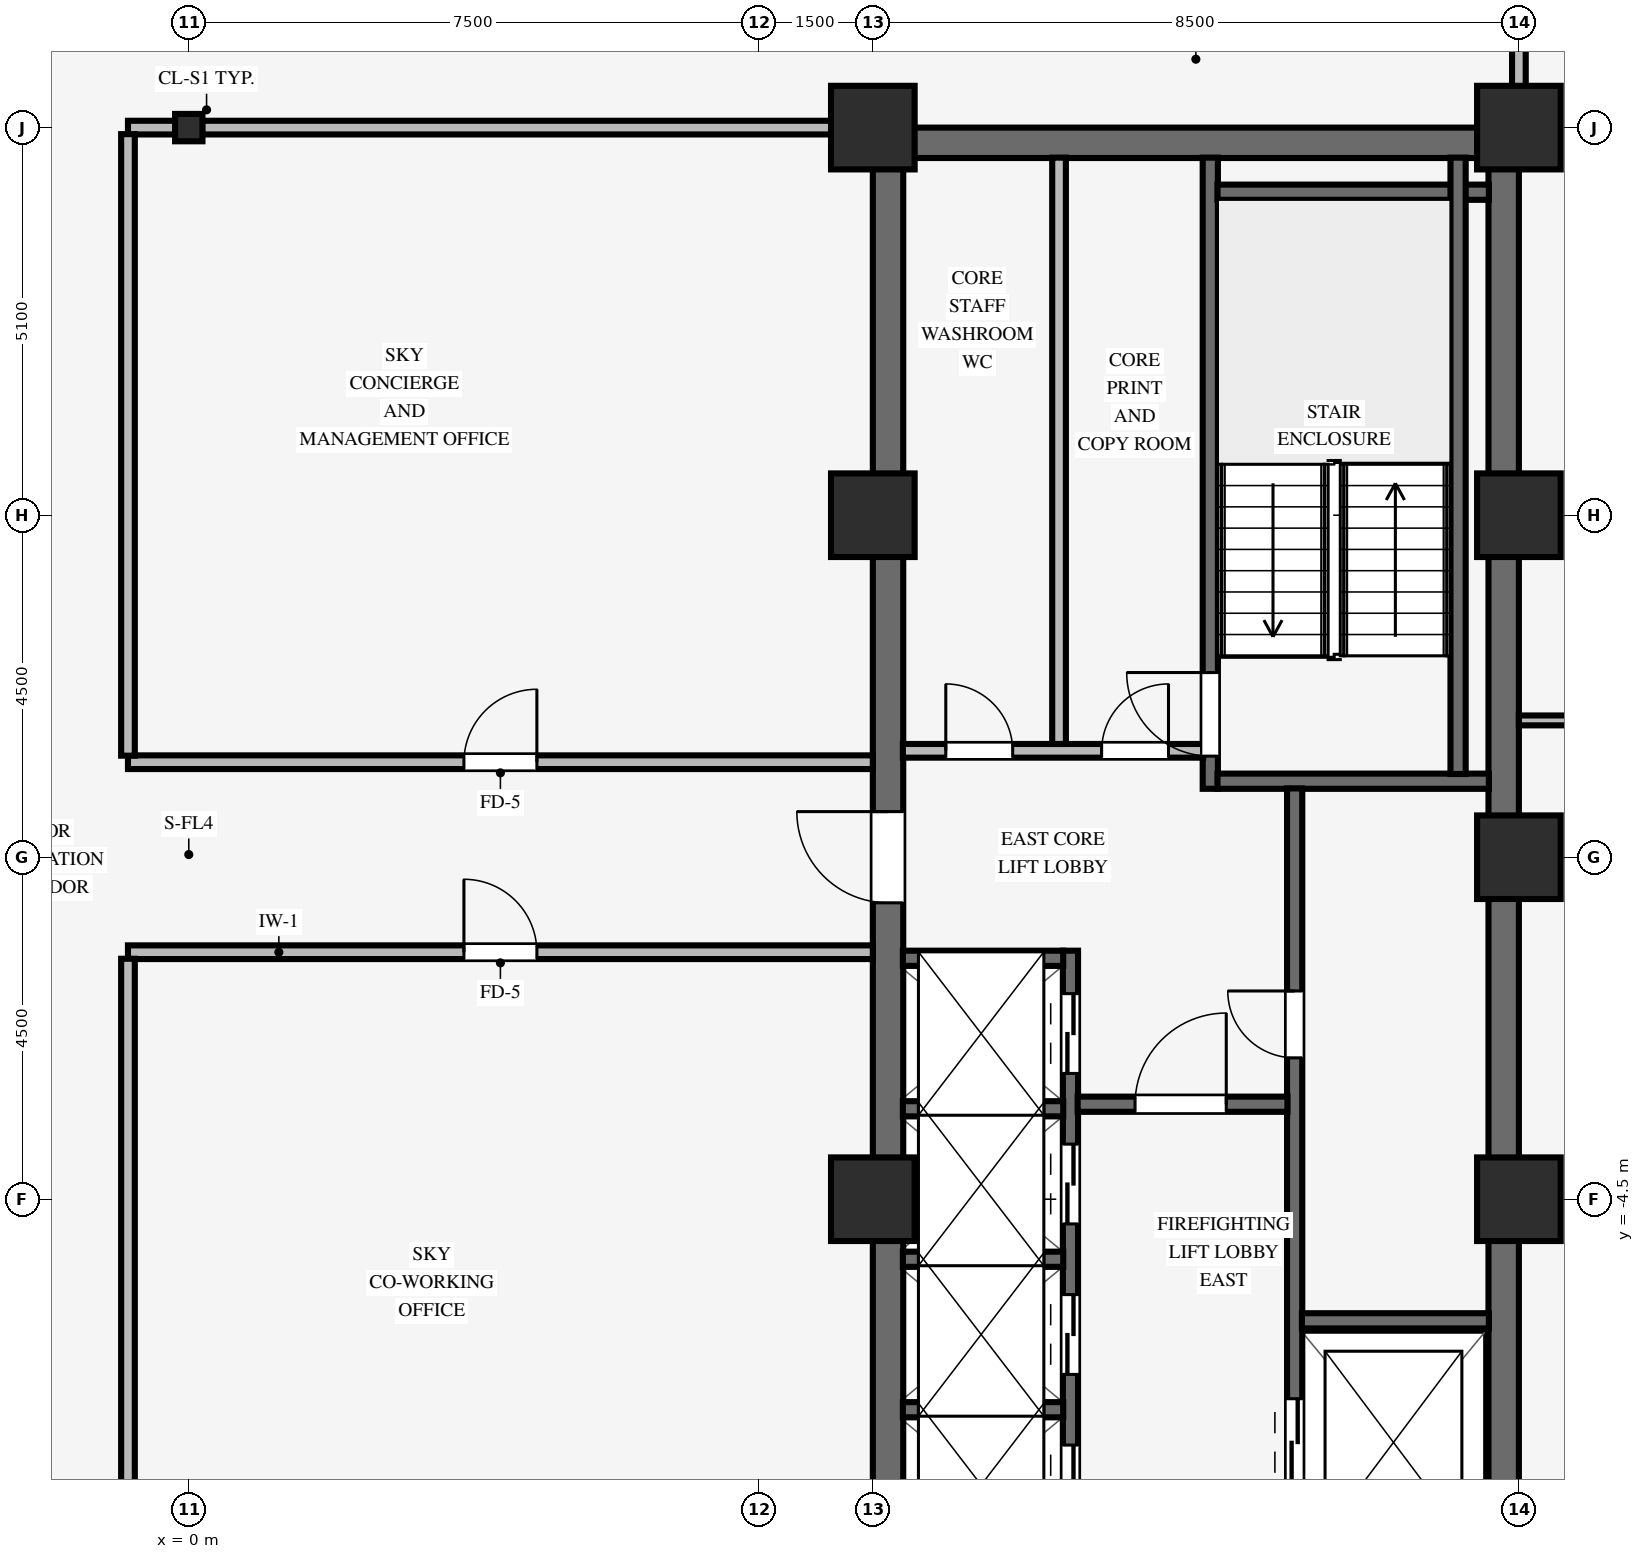
"""IFC4 building model, lengths in metres.
Left out: names, types, materials, properties, quantities, classifications, styles, units other than length and angle.
Written with IfcOpenShell. Run it as: python <this file> out.ifc"""

import sys

from ifc_helpers import new_model, si_unit, direction, frame, frame_2d, origin, origin_2d, place, context, subcontext, project, spatial, rectangle, i_section, extrude, source, transform, mapped, element, fill, save


model = new_model("IFC4")
c1 = context("Model", 3, precision=1e-05, world=origin(), true_north=direction((0.0, 1.0)))
c2 = subcontext(c1, "Body", "Model", "MODEL_VIEW")
j1 = project(units=[si_unit("LENGTHUNIT", "METRE"), si_unit("PLANEANGLEUNIT", "RADIAN")], contexts=[c1])
p1 = place(None, origin())
s1 = spatial("IfcSite", under=j1, at=p1, CompositionType="ELEMENT")
p2 = place(p1, origin())
s2 = spatial("IfcBuilding", under=s1, at=p2, CompositionType="ELEMENT")
p3 = place(p2, frame((0.0, 0.0, 120.2)))
s3 = spatial("IfcBuildingStorey", under=s2, at=p3, CompositionType="ELEMENT", Elevation=120.2)
p4 = place(p3, frame((9.0, 9.4, 0.0), z_axis=(0.0, 0.0, 1.0), x_axis=(1.0, 0.0, 0.0)))
e1 = element("IfcWall", 1, at=p4, inside=s3, PredefinedType="SHEAR", context=c2, shape_type="SweptSolid", body=[
    extrude(rectangle(XDim=8.5, YDim=0.4, at=frame_2d((4.25, 0.0))), origin(), (0.0, 0.0, 1.0), 3.37),
])
p5 = place(p3, frame((9.2, -9.205, 0.0), z_axis=(0.0, 0.0, 1.0), x_axis=(0.0, 1.0, 0.0)))
e2 = element("IfcWall", 2, at=p5, inside=s3, PredefinedType="SHEAR", context=c2, shape_type="SweptSolid", body=[
    extrude(rectangle(XDim=18.41, YDim=0.4, at=frame_2d((9.205, 0.0))), origin(), (0.0, 0.0, 1.0), 3.37),
])
p6 = place(p5, frame((8.605, 0.0, 0.0)))
e3 = element("IfcOpeningElement", 3, at=p6, cuts=e2, PredefinedType="OPENING", context=c2, shape_type="SweptSolid", body=[
    extrude(rectangle(XDim=1.2, YDim=2.15, at=frame_2d((0.6, 1.075))), frame((0.0, 0.21, 0.0), z_axis=(0.0, -1.0, 0.0), x_axis=(1.0, 0.0, 0.0)), (0.0, 0.0, 1.0), 0.42),
])
p7 = place(p3, frame((17.3, -9.205, 0.0), z_axis=(0.0, 0.0, 1.0), x_axis=(0.0, 1.0, 0.0)))
e4 = element("IfcWall", 4, at=p7, inside=s3, PredefinedType="SHEAR", context=c2, shape_type="SweptSolid", body=[
    extrude(rectangle(XDim=18.41, YDim=0.4, at=frame_2d((9.205, 0.0))), origin(), (0.0, 0.0, 1.0), 3.37),
])
for number, where, z_axis, x_axis in (
    (5, (9.0, -4.5, 0.0), (0.0, 0.0, 1.0), (1.0, 0.0, 0.0)),
    (6, (9.0, 4.5, 0.0), (0.0, 0.0, 1.0), (1.0, 0.0, 0.0)),
    (7, (9.0, 9.6, 0.0), (0.0, 0.0, 1.0), (1.0, 0.0, 0.0)),
    (8, (17.5, -4.5, 0.0), (0.0, 0.0, 1.0), (1.0, 0.0, 0.0)),
    (9, (17.5, 4.5, 0.0), (0.0, 0.0, 1.0), (1.0, 0.0, 0.0)),
    (10, (17.5, 9.6, 0.0), (0.0, 0.0, 1.0), (1.0, 0.0, 0.0)),
    (11, (17.5, 0.0, 0.0), (0.0, 0.0, 1.0), (1.0, 0.0, 0.0)),
):
    element("IfcColumn", number, at=place(p3, frame(where, z_axis=z_axis, x_axis=x_axis)), inside=s3, PredefinedType="COLUMN", context=c2, shape_type="SweptSolid", body=[
        extrude(rectangle(XDim=1.1, YDim=1.1, at=origin_2d()), origin(), (0.0, 0.0, 1.0), 3.37),
    ])
p8 = place(p3, frame((0.0, 9.6, 0.0), z_axis=(0.0, 0.0, 1.0), x_axis=(1.0, 0.0, 0.0)))
e12 = element("IfcColumn", 12, at=p8, inside=s3, PredefinedType="COLUMN", context=c2, shape_type="SweptSolid", body=[
    extrude(i_section(OverallWidth=0.36, OverallDepth=0.36, WebThickness=0.021, FlangeThickness=0.021, FilletRadius=0.018, at=origin_2d()), origin(), (0.0, 0.0, 1.0), 3.37),
])
p9 = place(p3, frame((13.44, 0.9, 0.0), z_axis=(0.0, 0.0, 1.0), x_axis=(0.0, 1.0, 0.0)))
e13 = element("IfcWall", 13, at=p9, inside=s3, PredefinedType="SHEAR", context=c2, shape_type="SweptSolid", body=[
    extrude(rectangle(XDim=8.305, YDim=0.2, at=frame_2d((4.153, 0.0))), origin(), (0.0, 0.0, 1.0), 3.37),
])
p10 = place(p9, frame((0.43, 0.0, 0.0)))
e14 = element("IfcOpeningElement", 14, at=p10, cuts=e13, PredefinedType="OPENING", context=c2, shape_type="SweptSolid", body=[
    extrude(rectangle(XDim=1.1, YDim=2.15, at=frame_2d((0.55, 1.075))), frame((0.0, 0.11, 0.0), z_axis=(0.0, -1.0, 0.0), x_axis=(1.0, 0.0, 0.0)), (0.0, 0.0, 1.0), 0.22),
])
for number, where, z_axis, x_axis in (
    (15, (13.535, 1.0, 0.0), (0.0, 0.0, 1.0), (1.0, 0.0, 0.0)),
    (16, (13.535, 8.75, 0.0), (0.0, 0.0, 1.0), (1.0, 0.0, 0.0)),
):
    element("IfcWall", number, at=place(p3, frame(where, z_axis=z_axis, x_axis=x_axis)), inside=s3, PredefinedType="SHEAR", context=c2, shape_type="SweptSolid", body=[
        extrude(rectangle(XDim=3.57, YDim=0.2, at=frame_2d((1.785, 0.0))), origin(), (0.0, 0.0, 1.0), 3.37),
    ])
p11 = place(p3, frame((16.7, 1.095, 0.0), z_axis=(0.0, 0.0, 1.0), x_axis=(0.0, 1.0, 0.0)))
e17 = element("IfcWall", 17, at=p11, inside=s3, PredefinedType="SHEAR", context=c2, shape_type="SweptSolid", body=[
    extrude(rectangle(XDim=8.11, YDim=0.2, at=frame_2d((4.055, 0.0))), origin(), (0.0, 0.0, 1.0), 3.37),
])
p12 = place(p3, frame((14.55, -9.205, 0.0), z_axis=(0.0, 0.0, 1.0), x_axis=(0.0, 1.0, 0.0)))
e18 = element("IfcWall", 18, at=p12, inside=s3, PredefinedType="SHEAR", context=c2, shape_type="SweptSolid", body=[
    extrude(rectangle(XDim=10.11, YDim=0.2, at=frame_2d((5.055, 0.0))), origin(), (0.0, 0.0, 1.0), 3.37),
])
p13 = place(p12, frame((6.565, 0.0, 0.0)))
e19 = element("IfcOpeningElement", 19, at=p13, cuts=e18, PredefinedType="OPENING", context=c2, shape_type="SweptSolid", body=[
    extrude(rectangle(XDim=0.88, YDim=2.1, at=frame_2d((0.44, 1.05))), frame((0.0, 0.11, 0.0), z_axis=(0.0, -1.0, 0.0), x_axis=(1.0, 0.0, 0.0)), (0.0, 0.0, 1.0), 0.22),
])
p14 = place(p12, frame((0.93, 0.0, 0.0)))
e20 = element("IfcOpeningElement", 20, at=p14, cuts=e18, PredefinedType="OPENING", context=c2, shape_type="SweptSolid", body=[
    extrude(rectangle(XDim=1.15, YDim=2.15, at=frame_2d((0.575, 1.075))), frame((0.0, 0.11, 0.0), z_axis=(0.0, -1.0, 0.0), x_axis=(1.0, 0.0, 0.0)), (0.0, 0.0, 1.0), 0.22),
])
p15 = place(p3, frame((14.645, -6.1, 0.0), z_axis=(0.0, 0.0, 1.0), x_axis=(1.0, 0.0, 0.0)))
e21 = element("IfcWall", 21, at=p15, inside=s3, PredefinedType="SHEAR", context=c2, shape_type="SweptSolid", body=[
    extrude(rectangle(XDim=2.46, YDim=0.2, at=frame_2d((1.23, 0.0))), origin(), (0.0, 0.0, 1.0), 3.37),
])
p16 = place(p3, frame((11.6, -9.205, 0.0), z_axis=(0.0, 0.0, 1.0), x_axis=(0.0, 1.0, 0.0)))
e22 = element("IfcWall", 22, at=p16, inside=s3, PredefinedType="SHEAR", context=c2, shape_type="SweptSolid", body=[
    extrude(rectangle(XDim=7.975, YDim=0.2, at=frame_2d((3.988, 0.0))), origin(), (0.0, 0.0, 1.0), 3.37),
])
p17 = place(p16, frame((0.42, 0.0, 0.0)))
e23 = element("IfcOpeningElement", 23, at=p17, cuts=e22, PredefinedType="OPENING", context=c2, shape_type="SweptSolid", body=[
    extrude(rectangle(XDim=1.05, YDim=2.15, at=frame_2d((0.525, 1.075))), frame((0.0, 0.11, 0.0), z_axis=(0.0, -1.0, 0.0), x_axis=(1.0, 0.0, 0.0)), (0.0, 0.0, 1.0), 0.22),
])
p18 = place(p16, frame((2.4, 0.0, 0.0)))
e24 = element("IfcOpeningElement", 24, at=p18, cuts=e22, PredefinedType="OPENING", context=c2, shape_type="SweptSolid", body=[
    extrude(rectangle(XDim=1.05, YDim=2.15, at=frame_2d((0.525, 1.075))), frame((0.0, 0.11, 0.0), z_axis=(0.0, -1.0, 0.0), x_axis=(1.0, 0.0, 0.0)), (0.0, 0.0, 1.0), 0.22),
])
p19 = place(p16, frame((4.38, 0.0, 0.0)))
e25 = element("IfcOpeningElement", 25, at=p19, cuts=e22, PredefinedType="OPENING", context=c2, shape_type="SweptSolid", body=[
    extrude(rectangle(XDim=1.05, YDim=2.15, at=frame_2d((0.525, 1.075))), frame((0.0, 0.11, 0.0), z_axis=(0.0, -1.0, 0.0), x_axis=(1.0, 0.0, 0.0)), (0.0, 0.0, 1.0), 0.22),
])
p20 = place(p16, frame((6.36, 0.0, 0.0)))
e26 = element("IfcOpeningElement", 26, at=p20, cuts=e22, PredefinedType="OPENING", context=c2, shape_type="SweptSolid", body=[
    extrude(rectangle(XDim=1.05, YDim=2.15, at=frame_2d((0.525, 1.075))), frame((0.0, 0.11, 0.0), z_axis=(0.0, -1.0, 0.0), x_axis=(1.0, 0.0, 0.0)), (0.0, 0.0, 1.0), 0.22),
])
p21 = place(p3, frame((11.695, -3.25, 0.0), z_axis=(0.0, 0.0, 1.0), x_axis=(1.0, 0.0, 0.0)))
e27 = element("IfcWall", 27, at=p21, inside=s3, PredefinedType="SHEAR", context=c2, shape_type="SweptSolid", body=[
    extrude(rectangle(XDim=2.76, YDim=0.2, at=frame_2d((1.38, 0.0))), origin(), (0.0, 0.0, 1.0), 3.37),
])
p22 = place(p21, frame((0.755, 0.0, 0.0)))
e28 = element("IfcOpeningElement", 28, at=p22, cuts=e27, PredefinedType="OPENING", context=c2, shape_type="SweptSolid", body=[
    extrude(rectangle(XDim=1.2, YDim=2.15, at=frame_2d((0.6, 1.075))), frame((0.0, 0.11, 0.0), z_axis=(0.0, -1.0, 0.0), x_axis=(1.0, 0.0, 0.0)), (0.0, 0.0, 1.0), 0.22),
])
for number, where, z_axis, x_axis in (
    (29, (9.395, -7.27, 0.0), (0.0, 0.0, 1.0), (1.0, 0.0, 0.0)),
    (30, (9.395, -5.29, 0.0), (0.0, 0.0, 1.0), (1.0, 0.0, 0.0)),
    (31, (9.395, -3.31, 0.0), (0.0, 0.0, 1.0), (1.0, 0.0, 0.0)),
    (32, (9.395, -1.33, 0.0), (0.0, 0.0, 1.0), (1.0, 0.0, 0.0)),
):
    element("IfcWall", number, at=place(p3, frame(where, z_axis=z_axis, x_axis=x_axis)), inside=s3, PredefinedType="SHEAR", context=c2, shape_type="SweptSolid", body=[
        extrude(rectangle(XDim=2.11, YDim=0.2, at=frame_2d((1.055, 0.0))), origin(), (0.0, 0.0, 1.0), 3.37),
    ])
p23 = place(p3, frame((9.395, 1.4, 0.0), z_axis=(0.0, 0.0, 1.0), x_axis=(1.0, 0.0, 0.0)))
e33 = element("IfcWall", 33, at=p23, inside=s3, PredefinedType="PARTITIONING", context=c2, shape_type="SweptSolid", body=[
    extrude(rectangle(XDim=3.95, YDim=0.18, at=frame_2d((1.975, 0.0))), origin(), (0.0, 0.0, 1.0), 3.36),
])
p24 = place(p23, frame((0.565, 0.0, 0.0)))
e34 = element("IfcOpeningElement", 34, at=p24, cuts=e33, PredefinedType="OPENING", context=c2, shape_type="SweptSolid", body=[
    extrude(rectangle(XDim=0.88, YDim=2.1, at=frame_2d((0.44, 1.05))), frame((0.0, 0.1, 0.0), z_axis=(0.0, -1.0, 0.0), x_axis=(1.0, 0.0, 0.0)), (0.0, 0.0, 1.0), 0.2),
])
p25 = place(p23, frame((2.615, 0.0, 0.0)))
e35 = element("IfcOpeningElement", 35, at=p25, cuts=e33, PredefinedType="OPENING", context=c2, shape_type="SweptSolid", body=[
    extrude(rectangle(XDim=0.88, YDim=2.1, at=frame_2d((0.44, 1.05))), frame((0.0, 0.1, 0.0), z_axis=(0.0, -1.0, 0.0), x_axis=(1.0, 0.0, 0.0)), (0.0, 0.0, 1.0), 0.2),
])
p26 = place(p3, frame((11.45, 1.49, 0.0), z_axis=(0.0, 0.0, 1.0), x_axis=(0.0, 1.0, 0.0)))
e36 = element("IfcWall", 36, at=p26, inside=s3, PredefinedType="PARTITIONING", context=c2, shape_type="SweptSolid", body=[
    extrude(rectangle(XDim=7.715, YDim=0.18, at=frame_2d((3.857, 0.0))), origin(), (0.0, 0.0, 1.0), 3.36),
])
p27 = place(p3, frame((-0.8, -1.25, 0.0), z_axis=(0.0, 0.0, 1.0), x_axis=(1.0, 0.0, 0.0)))
e37 = element("IfcWall", 37, at=p27, inside=s3, PredefinedType="PARTITIONING", context=c2, shape_type="SweptSolid", body=[
    extrude(rectangle(XDim=9.8, YDim=0.18, at=frame_2d((4.9, 0.0))), origin(), (0.0, 0.0, 1.0), 3.36),
])
p28 = place(p27, frame((4.42, 0.0, 0.0)))
e38 = element("IfcOpeningElement", 38, at=p28, cuts=e37, PredefinedType="OPENING", context=c2, shape_type="SweptSolid", body=[
    extrude(rectangle(XDim=0.96, YDim=2.1, at=frame_2d((0.48, 1.05))), frame((0.0, 0.1, 0.0), z_axis=(0.0, -1.0, 0.0), x_axis=(1.0, 0.0, 0.0)), (0.0, 0.0, 1.0), 0.2),
])
p29 = place(p3, frame((-0.8, 1.25, 0.0), z_axis=(0.0, 0.0, 1.0), x_axis=(1.0, 0.0, 0.0)))
e39 = element("IfcWall", 39, at=p29, inside=s3, PredefinedType="PARTITIONING", context=c2, shape_type="SweptSolid", body=[
    extrude(rectangle(XDim=9.8, YDim=0.18, at=frame_2d((4.9, 0.0))), origin(), (0.0, 0.0, 1.0), 3.36),
])
p30 = place(p29, frame((4.42, 0.0, 0.0)))
e40 = element("IfcOpeningElement", 40, at=p30, cuts=e39, PredefinedType="OPENING", context=c2, shape_type="SweptSolid", body=[
    extrude(rectangle(XDim=0.96, YDim=2.1, at=frame_2d((0.48, 1.05))), frame((0.0, 0.1, 0.0), z_axis=(0.0, -1.0, 0.0), x_axis=(1.0, 0.0, 0.0)), (0.0, 0.0, 1.0), 0.2),
])
p31 = place(p3, frame((17.5, 1.8, 0.0), z_axis=(0.0, 0.0, 1.0), x_axis=(1.0, 0.0, 0.0)))
e41 = element("IfcWall", 41, at=p31, inside=s3, PredefinedType="PARTITIONING", context=c2, shape_type="SweptSolid", body=[
    extrude(rectangle(XDim=8.725, YDim=0.13, at=frame_2d((4.363, 0.0))), origin(), (0.0, 0.0, 1.0), 3.36),
])
p32 = place(p3, frame((-0.8, 9.6, 0.0), z_axis=(0.0, 0.0, 1.0), x_axis=(1.0, 0.0, 0.0)))
e42 = element("IfcWall", 42, at=p32, inside=s3, PredefinedType="PARTITIONING", context=c2, shape_type="SweptSolid", body=[
    extrude(rectangle(XDim=0.624, YDim=0.18, at=frame_2d((0.312, 0.0))), origin(), (0.0, 0.0, 1.0), 2.405),
])
p33 = place(p3, frame((0.176, 9.6, 0.0), z_axis=(0.0, 0.0, 1.0), x_axis=(1.0, 0.0, 0.0)))
e43 = element("IfcWall", 43, at=p33, inside=s3, PredefinedType="PARTITIONING", context=c2, shape_type="SweptSolid", body=[
    extrude(rectangle(XDim=8.278, YDim=0.18, at=frame_2d((4.139, 0.0))), origin(), (0.0, 0.0, 1.0), 2.405),
])
for number, where, z_axis, x_axis in (
    (44, (-0.8, -9.514, 0.0), (0.0, 0.0, 1.0), (0.0, 1.0, 0.0)),
    (45, (-0.8, 1.336, 0.0), (0.0, 0.0, 1.0), (0.0, 1.0, 0.0)),
):
    element("IfcWall", number, at=place(p3, frame(where, z_axis=z_axis, x_axis=x_axis)), inside=s3, PredefinedType="PARTITIONING", context=c2, shape_type="SweptSolid", body=[
        extrude(rectangle(XDim=8.178, YDim=0.18, at=frame_2d((4.089, 0.0))), origin(), (0.0, 0.0, 1.0), 3.36),
    ])
p34 = place(p3, frame((17.5, 10.146, 0.0), z_axis=(0.0, 0.0, 1.0), x_axis=(0.0, 1.0, 0.0)))
e46 = element("IfcWall", 46, at=p34, inside=s3, PredefinedType="PARTITIONING", context=c2, shape_type="SweptSolid", body=[
    extrude(rectangle(XDim=0.968, YDim=0.18, at=frame_2d((0.484, 0.0))), origin(), (0.0, 0.0, 1.0), 2.816),
])
m1 = source(origin(), c2, "Body", "SweptSolid", [
    extrude(rectangle(XDim=1.1, YDim=2.15, at=frame_2d((0.55, 1.075))), frame((0.0, 0.025, 0.0), z_axis=(0.0, -1.0, 0.0), x_axis=(1.0, 0.0, 0.0)), (0.0, 0.0, 1.0), 0.05),
])
p35 = place(p10, origin())
e47 = element("IfcDoor", 47, at=p35, inside=s3, OperationType="SINGLE_SWING_RIGHT", PredefinedType="DOOR", context=c2, shape_type="MappedRepresentation", body=[
    mapped(m1, transform((0.0, 0.0, 0.0), scale=1.0)),
])
fill(e14, e47)
m2 = source(origin(), c2, "Body", "SweptSolid", [
    extrude(rectangle(XDim=0.88, YDim=2.1, at=frame_2d((0.44, 1.05))), frame((0.0, 0.025, 0.0), z_axis=(0.0, -1.0, 0.0), x_axis=(1.0, 0.0, 0.0)), (0.0, 0.0, 1.0), 0.05),
])
p36 = place(p13, origin())
e48 = element("IfcDoor", 48, at=p36, inside=s3, OperationType="SINGLE_SWING_RIGHT", PredefinedType="DOOR", context=c2, shape_type="MappedRepresentation", body=[
    mapped(m2, transform((0.0, 0.0, 0.0), scale=1.0)),
])
fill(e19, e48)
m3 = source(origin(), c2, "Body", "SweptSolid", [
    extrude(rectangle(XDim=1.2, YDim=2.15, at=frame_2d((0.6, 1.075))), frame((0.0, 0.025, 0.0), z_axis=(0.0, -1.0, 0.0), x_axis=(1.0, 0.0, 0.0)), (0.0, 0.0, 1.0), 0.05),
])
p37 = place(p22, origin())
e49 = element("IfcDoor", 49, at=p37, inside=s3, OperationType="SINGLE_SWING_RIGHT", PredefinedType="DOOR", context=c2, shape_type="MappedRepresentation", body=[
    mapped(m3, transform((0.0, 0.0, 0.0), scale=1.0)),
])
fill(e28, e49)
p38 = place(p6, origin())
e50 = element("IfcDoor", 50, at=p38, inside=s3, OperationType="SINGLE_SWING_RIGHT", PredefinedType="DOOR", context=c2, shape_type="MappedRepresentation", body=[
    mapped(m3, transform((0.0, 0.0, 0.0), scale=1.0)),
])
fill(e3, e50)
p39 = place(p24, origin())
e51 = element("IfcDoor", 51, at=p39, inside=s3, OperationType="SINGLE_SWING_LEFT", PredefinedType="DOOR", context=c2, shape_type="MappedRepresentation", body=[
    mapped(m2, transform((0.0, 0.0, 0.0), scale=1.0)),
])
fill(e34, e51)
p40 = place(p25, origin())
e52 = element("IfcDoor", 52, at=p40, inside=s3, OperationType="SINGLE_SWING_RIGHT", PredefinedType="DOOR", context=c2, shape_type="MappedRepresentation", body=[
    mapped(m2, transform((0.0, 0.0, 0.0), scale=1.0)),
])
fill(e35, e52)
m4 = source(origin(), c2, "Body", "SweptSolid", [
    extrude(rectangle(XDim=1.15, YDim=2.15, at=frame_2d((0.575, 1.075))), frame((0.0, 0.025, 0.0), z_axis=(0.0, -1.0, 0.0), x_axis=(1.0, 0.0, 0.0)), (0.0, 0.0, 1.0), 0.05),
])
p41 = place(p14, origin())
e53 = element("IfcDoor", 53, at=p41, inside=s3, OperationType="DOUBLE_DOOR_SLIDING", PredefinedType="DOOR", context=c2, shape_type="MappedRepresentation", body=[
    mapped(m4, transform((0.0, 0.0, 0.0), scale=1.0)),
])
fill(e20, e53)
m5 = source(origin(), c2, "Body", "SweptSolid", [
    extrude(rectangle(XDim=1.05, YDim=2.15, at=frame_2d((0.525, 1.075))), frame((0.0, 0.025, 0.0), z_axis=(0.0, -1.0, 0.0), x_axis=(1.0, 0.0, 0.0)), (0.0, 0.0, 1.0), 0.05),
])
p42 = place(p17, origin())
e54 = element("IfcDoor", 54, at=p42, inside=s3, OperationType="DOUBLE_DOOR_SLIDING", PredefinedType="DOOR", context=c2, shape_type="MappedRepresentation", body=[
    mapped(m5, transform((0.0, 0.0, 0.0), scale=1.0)),
])
fill(e23, e54)
p43 = place(p18, origin())
e55 = element("IfcDoor", 55, at=p43, inside=s3, OperationType="DOUBLE_DOOR_SLIDING", PredefinedType="DOOR", context=c2, shape_type="MappedRepresentation", body=[
    mapped(m5, transform((0.0, 0.0, 0.0), scale=1.0)),
])
fill(e24, e55)
p44 = place(p19, origin())
e56 = element("IfcDoor", 56, at=p44, inside=s3, OperationType="DOUBLE_DOOR_SLIDING", PredefinedType="DOOR", context=c2, shape_type="MappedRepresentation", body=[
    mapped(m5, transform((0.0, 0.0, 0.0), scale=1.0)),
])
fill(e25, e56)
p45 = place(p20, origin())
e57 = element("IfcDoor", 57, at=p45, inside=s3, OperationType="DOUBLE_DOOR_SLIDING", PredefinedType="DOOR", context=c2, shape_type="MappedRepresentation", body=[
    mapped(m5, transform((0.0, 0.0, 0.0), scale=1.0)),
])
fill(e26, e57)
m6 = source(origin(), c2, "Body", "SweptSolid", [
    extrude(rectangle(XDim=0.96, YDim=2.1, at=frame_2d((0.48, 1.05))), frame((0.0, 0.025, 0.0), z_axis=(0.0, -1.0, 0.0), x_axis=(1.0, 0.0, 0.0)), (0.0, 0.0, 1.0), 0.05),
])
p46 = place(p30, origin())
e58 = element("IfcDoor", 58, at=p46, inside=s3, OperationType="SINGLE_SWING_RIGHT", PredefinedType="DOOR", context=c2, shape_type="MappedRepresentation", body=[
    mapped(m6, transform((0.0, 0.0, 0.0), scale=1.0)),
])
fill(e40, e58)
p47 = place(p28, origin())
e59 = element("IfcDoor", 59, at=p47, inside=s3, OperationType="SINGLE_SWING_LEFT", PredefinedType="DOOR", context=c2, shape_type="MappedRepresentation", body=[
    mapped(m6, transform((0.0, 0.0, 0.0), scale=1.0)),
])
fill(e38, e59)
save(model, sys.argv[1])
